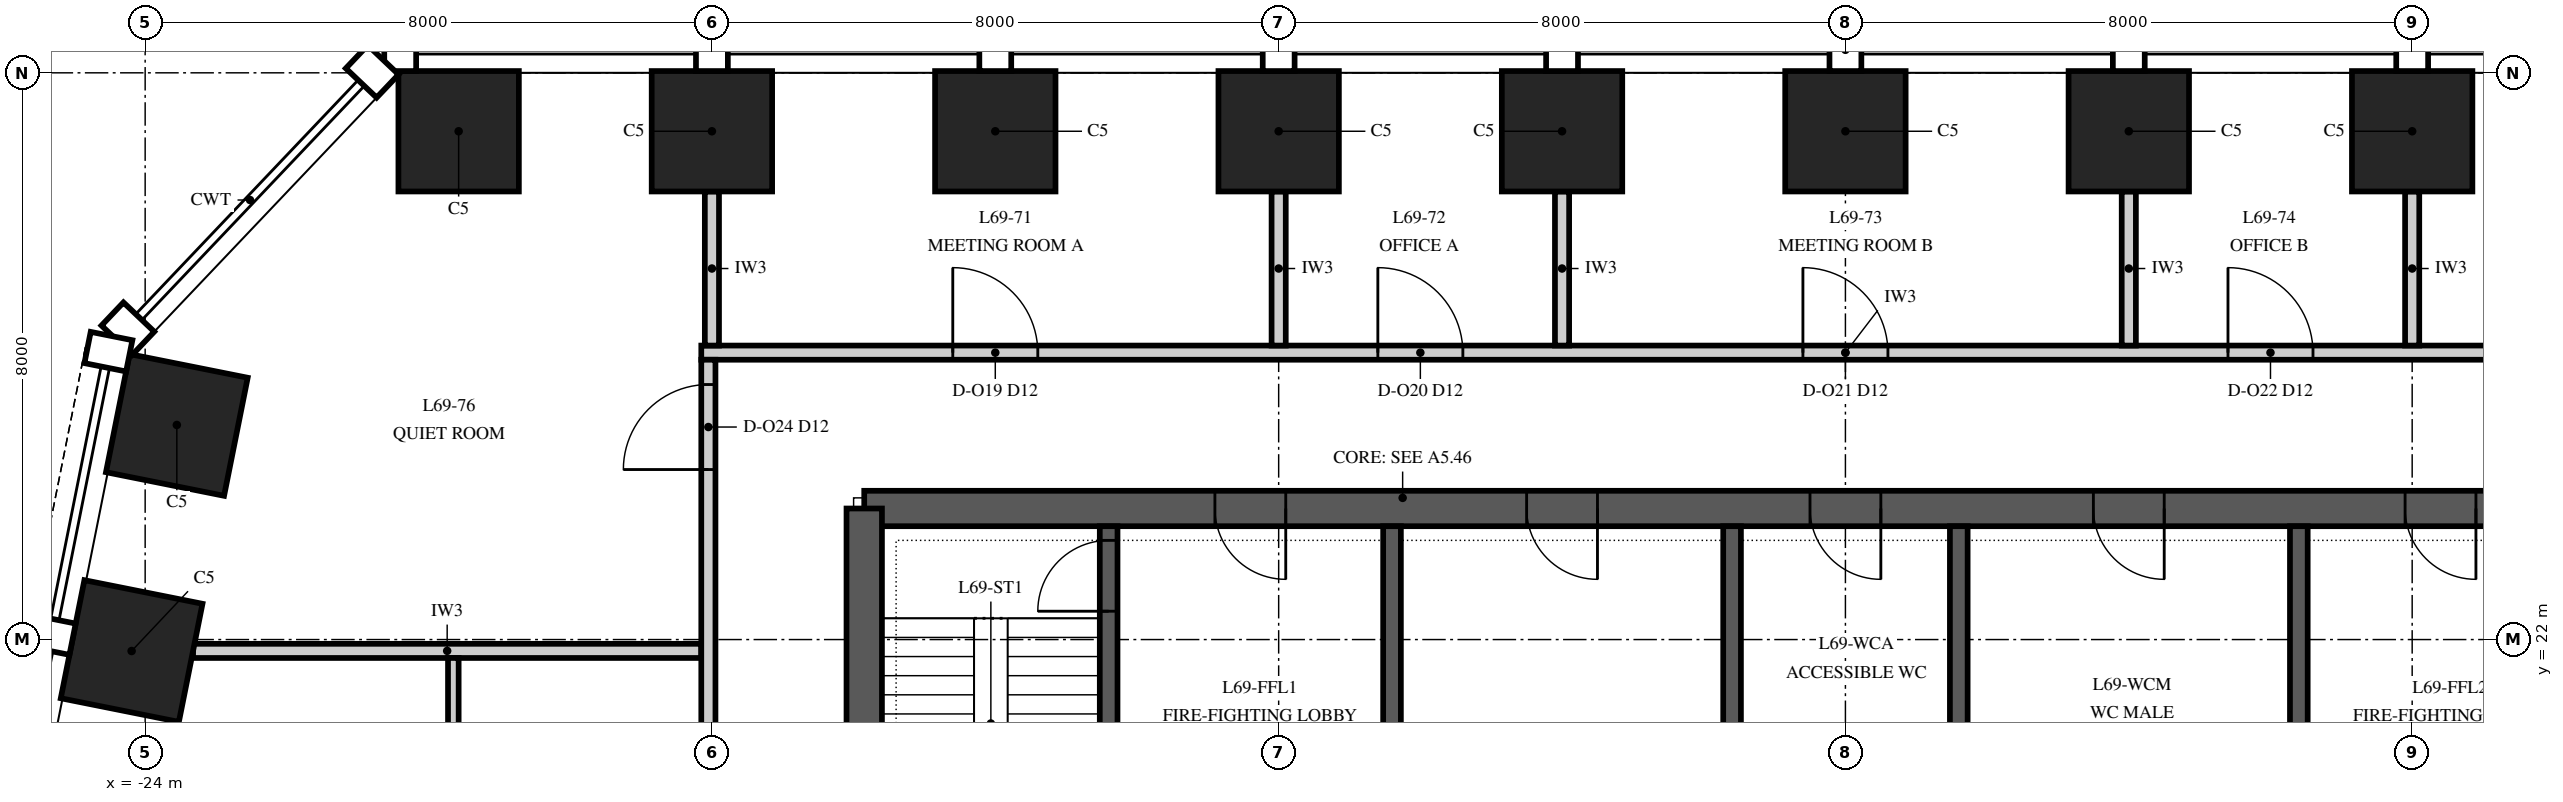
"""IFC4 building model, lengths in metres.
Left out: names, types, materials, properties, quantities, classifications, styles, units other than length and angle.
Written with IfcOpenShell. Run it as: python <this file> out.ifc"""

import sys

from ifc_helpers import new_model, si_unit, direction, frame, frame_2d, origin, origin_2d, place, context, subcontext, project, spatial, polyline, rectangle, outline, extrude, element, fill, save


model = new_model("IFC4")
c1 = context("Model", 3, precision=1e-05, world=origin(), true_north=direction((0.0, 1.0)))
c2 = subcontext(c1, "Body", "Model", "MODEL_VIEW")
j1 = project(units=[si_unit("LENGTHUNIT", "METRE"), si_unit("PLANEANGLEUNIT", "RADIAN")], contexts=[c1])
p1 = place(None, origin())
s1 = spatial("IfcSite", under=j1, at=p1, CompositionType="ELEMENT")
p2 = place(p1, origin())
s2 = spatial("IfcBuilding", under=s1, at=p2, CompositionType="ELEMENT")
p3 = place(p2, frame((0.0, 0.0, 296.0)))
s3 = spatial("IfcBuildingStorey", under=s2, at=p3, CompositionType="ELEMENT", Elevation=296.0)
for number, where, z_axis, x_axis in (
    (1, (8.0, 29.175, 0.0), (0.0, 0.0, 1.0), (-1.0, 0.0, 0.0)),
    (2, (4.0, 29.175, 0.0), (0.0, 0.0, 1.0), (-1.0, 0.0, 0.0)),
    (3, (0.0, 29.175, 0.0), (0.0, 0.0, 1.0), (-1.0, 0.0, 0.0)),
    (4, (-4.0, 29.175, 0.0), (0.0, 0.0, 1.0), (-1.0, 0.0, 0.0)),
    (5, (-8.0, 29.175, 0.0), (0.0, 0.0, 1.0), (-1.0, 0.0, 0.0)),
    (6, (-12.0, 29.175, 0.0), (0.0, 0.0, 1.0), (-1.0, 0.0, 0.0)),
    (7, (-16.0, 29.175, 0.0), (0.0, 0.0, 1.0), (-1.0, 0.0, 0.0)),
    (8, (-19.575, 29.175, 0.0), (0.0, 0.0, 1.0), (-1.0, 0.0, 0.0)),
    (9, (-23.553, 25.029, 0.0), (0.0, 0.0, 1.0), (-0.196, -0.981, 0.0)),
    (10, (-24.191, 21.838, 0.0), (0.0, 0.0, 1.0), (-0.196, -0.981, 0.0)),
):
    element("IfcColumn", number, at=place(p3, frame(where, z_axis=z_axis, x_axis=x_axis)), inside=s3, PredefinedType="COLUMN", context=c2, shape_type="SweptSolid", body=[
        extrude(rectangle(XDim=1.7, YDim=1.7, at=origin_2d()), origin(), (0.0, 0.0, 1.0), 4.0),
    ])
p4 = place(p3, frame((13.85, 23.85, 0.0), z_axis=(0.0, 0.0, 1.0), x_axis=(-1.0, 0.0, 0.0)))
e11 = element("IfcWall", 11, at=p4, inside=s3, PredefinedType="SHEAR", context=c2, shape_type="SweptSolid", body=[
    extrude(rectangle(XDim=27.7, YDim=0.5, at=frame_2d((13.85, 0.0))), origin(), (0.0, 0.0, 1.0), 4.0),
])
p5 = place(p4, frame((21.75, 0.0, 0.0)))
e12 = element("IfcOpeningElement", 12, at=p5, cuts=e11, PredefinedType="OPENING", context=c2, shape_type="SweptSolid", body=[
    extrude(rectangle(XDim=1.0, YDim=2.1, at=frame_2d((0.5, 1.05))), frame((0.0, 0.265, 0.0), z_axis=(0.0, -1.0, 0.0), x_axis=(1.0, 0.0, 0.0)), (0.0, 0.0, 1.0), 0.53),
])
p6 = place(p4, frame((4.95, 0.0, 0.0)))
e13 = element("IfcOpeningElement", 13, at=p6, cuts=e11, PredefinedType="OPENING", context=c2, shape_type="SweptSolid", body=[
    extrude(rectangle(XDim=1.0, YDim=2.1, at=frame_2d((0.5, 1.05))), frame((0.0, 0.265, 0.0), z_axis=(0.0, -1.0, 0.0), x_axis=(1.0, 0.0, 0.0)), (0.0, 0.0, 1.0), 0.53),
])
p7 = place(p4, frame((17.35, 0.0, 0.0)))
e14 = element("IfcOpeningElement", 14, at=p7, cuts=e11, PredefinedType="OPENING", context=c2, shape_type="SweptSolid", body=[
    extrude(rectangle(XDim=1.0, YDim=2.1, at=frame_2d((0.5, 1.05))), frame((0.0, 0.265, 0.0), z_axis=(0.0, -1.0, 0.0), x_axis=(1.0, 0.0, 0.0)), (0.0, 0.0, 1.0), 0.53),
])
p8 = place(p4, frame((13.35, 0.0, 0.0)))
e15 = element("IfcOpeningElement", 15, at=p8, cuts=e11, PredefinedType="OPENING", context=c2, shape_type="SweptSolid", body=[
    extrude(rectangle(XDim=1.0, YDim=2.1, at=frame_2d((0.5, 1.05))), frame((0.0, 0.265, 0.0), z_axis=(0.0, -1.0, 0.0), x_axis=(1.0, 0.0, 0.0)), (0.0, 0.0, 1.0), 0.53),
])
p9 = place(p4, frame((9.35, 0.0, 0.0)))
e16 = element("IfcOpeningElement", 16, at=p9, cuts=e11, PredefinedType="OPENING", context=c2, shape_type="SweptSolid", body=[
    extrude(rectangle(XDim=1.0, YDim=2.1, at=frame_2d((0.5, 1.05))), frame((0.0, 0.265, 0.0), z_axis=(0.0, -1.0, 0.0), x_axis=(1.0, 0.0, 0.0)), (0.0, 0.0, 1.0), 0.53),
])
p10 = place(p3, frame((-13.85, 23.85, 0.0), z_axis=(0.0, 0.0, 1.0), x_axis=(0.0, -1.0, 0.0)))
e17 = element("IfcWall", 17, at=p10, inside=s3, PredefinedType="SHEAR", context=c2, shape_type="SweptSolid", body=[
    extrude(outline(polyline([(0.0, -0.25), (17.7, -0.25), (17.7, 0.0), (17.45, 0.0), (17.45, 0.25), (0.25, 0.25), (0.25, 0.0), (0.0, 0.0), (0.0, -0.25)])), origin(), (0.0, 0.0, 1.0), 4.0),
])
p11 = place(p10, frame((11.75, 0.0, 0.0)))
e18 = element("IfcOpeningElement", 18, at=p11, cuts=e17, PredefinedType="OPENING", context=c2, shape_type="SweptSolid", body=[
    extrude(rectangle(XDim=1.8, YDim=2.4, at=frame_2d((0.9, 1.2))), frame((0.0, 0.265, 0.0), z_axis=(0.0, -1.0, 0.0), x_axis=(1.0, 0.0, 0.0)), (0.0, 0.0, 1.0), 0.53),
])
p12 = place(p3, frame((-10.4, 16.125, 0.0), z_axis=(0.0, 0.0, 1.0), x_axis=(0.0, 1.0, 0.0)))
e19 = element("IfcWall", 19, at=p12, inside=s3, PredefinedType="SHEAR", context=c2, shape_type="SweptSolid", body=[
    extrude(rectangle(XDim=7.475, YDim=0.25, at=frame_2d((3.738, 0.0))), origin(), (0.0, 0.0, 1.0), 4.0),
])
p13 = place(p12, frame((6.275, 0.0, 0.0)))
e20 = element("IfcOpeningElement", 20, at=p13, cuts=e19, PredefinedType="OPENING", context=c2, shape_type="SweptSolid", body=[
    extrude(rectangle(XDim=1.0, YDim=2.1, at=frame_2d((0.5, 1.05))), frame((0.0, 0.14, 0.0), z_axis=(0.0, -1.0, 0.0), x_axis=(1.0, 0.0, 0.0)), (0.0, 0.0, 1.0), 0.28),
])
for number, where, z_axis, x_axis in (
    (21, (-6.4, 16.125, 0.0), (0.0, 0.0, 1.0), (0.0, 1.0, 0.0)),
    (22, (-1.6, 16.125, 0.0), (0.0, 0.0, 1.0), (0.0, 1.0, 0.0)),
    (23, (1.6, 16.125, 0.0), (0.0, 0.0, 1.0), (0.0, 1.0, 0.0)),
    (24, (6.4, 16.125, 0.0), (0.0, 0.0, 1.0), (0.0, 1.0, 0.0)),
):
    element("IfcWall", number, at=place(p3, frame(where, z_axis=z_axis, x_axis=x_axis)), inside=s3, PredefinedType="SHEAR", context=c2, shape_type="SweptSolid", body=[
        extrude(rectangle(XDim=7.475, YDim=0.25, at=frame_2d((3.738, 0.0))), origin(), (0.0, 0.0, 1.0), 4.0),
    ])
p14 = place(p3, frame((-23.324, 21.84, 0.0), z_axis=(0.0, 0.0, 1.0), x_axis=(1.0, 0.0, 0.0)))
e25 = element("IfcWall", 25, at=p14, inside=s3, PredefinedType="PARTITIONING", context=c2, shape_type="SweptSolid", body=[
    extrude(rectangle(XDim=7.174, YDim=0.2, at=frame_2d((3.587, 0.0))), origin(), (0.0, 0.0, 1.0), 3.23),
])
p15 = place(p3, frame((-16.15, 26.05, 0.0), z_axis=(0.0, 0.0, 1.0), x_axis=(1.0, 0.0, 0.0)))
e26 = element("IfcWall", 26, at=p15, inside=s3, PredefinedType="PARTITIONING", context=c2, shape_type="SweptSolid", body=[
    extrude(rectangle(XDim=32.3, YDim=0.2, at=frame_2d((16.15, 0.0))), origin(), (0.0, 0.0, 1.0), 3.418),
])
p16 = place(p15, frame((3.55, 0.0, 0.0)))
e27 = element("IfcOpeningElement", 27, at=p16, cuts=e26, PredefinedType="OPENING", context=c2, shape_type="SweptSolid", body=[
    extrude(rectangle(XDim=1.2, YDim=2.4, at=frame_2d((0.6, 1.2))), frame((0.0, 0.115, 0.0), z_axis=(0.0, -1.0, 0.0), x_axis=(1.0, 0.0, 0.0)), (0.0, 0.0, 1.0), 0.23),
])
p17 = place(p15, frame((9.55, 0.0, 0.0)))
e28 = element("IfcOpeningElement", 28, at=p17, cuts=e26, PredefinedType="OPENING", context=c2, shape_type="SweptSolid", body=[
    extrude(rectangle(XDim=1.2, YDim=2.4, at=frame_2d((0.6, 1.2))), frame((0.0, 0.115, 0.0), z_axis=(0.0, -1.0, 0.0), x_axis=(1.0, 0.0, 0.0)), (0.0, 0.0, 1.0), 0.23),
])
p18 = place(p15, frame((15.55, 0.0, 0.0)))
e29 = element("IfcOpeningElement", 29, at=p18, cuts=e26, PredefinedType="OPENING", context=c2, shape_type="SweptSolid", body=[
    extrude(rectangle(XDim=1.2, YDim=2.4, at=frame_2d((0.6, 1.2))), frame((0.0, 0.115, 0.0), z_axis=(0.0, -1.0, 0.0), x_axis=(1.0, 0.0, 0.0)), (0.0, 0.0, 1.0), 0.23),
])
p19 = place(p15, frame((21.55, 0.0, 0.0)))
e30 = element("IfcOpeningElement", 30, at=p19, cuts=e26, PredefinedType="OPENING", context=c2, shape_type="SweptSolid", body=[
    extrude(rectangle(XDim=1.2, YDim=2.4, at=frame_2d((0.6, 1.2))), frame((0.0, 0.115, 0.0), z_axis=(0.0, -1.0, 0.0), x_axis=(1.0, 0.0, 0.0)), (0.0, 0.0, 1.0), 0.23),
])
p20 = place(p15, frame((27.55, 0.0, 0.0)))
e31 = element("IfcOpeningElement", 31, at=p20, cuts=e26, PredefinedType="OPENING", context=c2, shape_type="SweptSolid", body=[
    extrude(rectangle(XDim=1.2, YDim=2.4, at=frame_2d((0.6, 1.2))), frame((0.0, 0.115, 0.0), z_axis=(0.0, -1.0, 0.0), x_axis=(1.0, 0.0, 0.0)), (0.0, 0.0, 1.0), 0.23),
])
p21 = place(p3, frame((-19.65, 17.915, 0.0), z_axis=(0.0, 0.0, 1.0), x_axis=(0.0, 1.0, 0.0)))
e32 = element("IfcWall", 32, at=p21, inside=s3, PredefinedType="PARTITIONING", context=c2, shape_type="SweptSolid", body=[
    extrude(rectangle(XDim=3.825, YDim=0.15, at=frame_2d((1.913, 0.0))), origin(), (0.0, 0.0, 1.0), 3.23),
])
p22 = place(p21, frame((1.425, 0.0, 0.0)))
e33 = element("IfcOpeningElement", 33, at=p22, cuts=e32, PredefinedType="OPENING", context=c2, shape_type="SweptSolid", body=[
    extrude(rectangle(XDim=1.0, YDim=2.3, at=frame_2d((0.5, 1.15))), frame((0.0, 0.09, 0.0), z_axis=(0.0, -1.0, 0.0), x_axis=(1.0, 0.0, 0.0)), (0.0, 0.0, 1.0), 0.18),
])
p23 = place(p3, frame((-16.05, 4.05, 0.0), z_axis=(0.0, 0.0, 1.0), x_axis=(0.0, 1.0, 0.0)))
e34 = element("IfcWall", 34, at=p23, inside=s3, PredefinedType="PARTITIONING", context=c2, shape_type="SweptSolid", body=[
    extrude(rectangle(XDim=21.9, YDim=0.2, at=frame_2d((10.95, 0.0))), origin(), (0.0, 0.0, 1.0), 2.842),
])
p24 = place(p23, frame((0.25, 0.0, 0.0)))
e35 = element("IfcOpeningElement", 35, at=p24, cuts=e34, PredefinedType="OPENING", context=c2, shape_type="SweptSolid", body=[
    extrude(rectangle(XDim=1.2, YDim=2.4, at=frame_2d((0.6, 1.2))), frame((0.0, 0.115, 0.0), z_axis=(0.0, -1.0, 0.0), x_axis=(1.0, 0.0, 0.0)), (0.0, 0.0, 1.0), 0.23),
])
p25 = place(p23, frame((7.35, 0.0, 0.0)))
e36 = element("IfcOpeningElement", 36, at=p25, cuts=e34, PredefinedType="OPENING", context=c2, shape_type="SweptSolid", body=[
    extrude(rectangle(XDim=1.2, YDim=2.4, at=frame_2d((0.6, 1.2))), frame((0.0, 0.115, 0.0), z_axis=(0.0, -1.0, 0.0), x_axis=(1.0, 0.0, 0.0)), (0.0, 0.0, 1.0), 0.23),
])
p26 = place(p23, frame((20.35, 0.0, 0.0)))
e37 = element("IfcOpeningElement", 37, at=p26, cuts=e34, PredefinedType="OPENING", context=c2, shape_type="SweptSolid", body=[
    extrude(rectangle(XDim=1.2, YDim=2.4, at=frame_2d((0.6, 1.2))), frame((0.0, 0.115, 0.0), z_axis=(0.0, -1.0, 0.0), x_axis=(1.0, 0.0, 0.0)), (0.0, 0.0, 1.0), 0.23),
])
for number, where, z_axis, x_axis in (
    (38, (-16.0, 26.15, 0.0), (0.0, 0.0, 1.0), (0.0, 1.0, 0.0)),
    (39, (-8.0, 26.15, 0.0), (0.0, 0.0, 1.0), (0.0, 1.0, 0.0)),
    (40, (-4.0, 26.15, 0.0), (0.0, 0.0, 1.0), (0.0, 1.0, 0.0)),
    (41, (4.0, 26.15, 0.0), (0.0, 0.0, 1.0), (0.0, 1.0, 0.0)),
    (42, (8.0, 26.15, 0.0), (0.0, 0.0, 1.0), (0.0, 1.0, 0.0)),
):
    element("IfcWall", number, at=place(p3, frame(where, z_axis=z_axis, x_axis=x_axis)), inside=s3, PredefinedType="PARTITIONING", context=c2, shape_type="SweptSolid", body=[
        extrude(rectangle(XDim=2.175, YDim=0.2, at=frame_2d((1.087, 0.0))), origin(), (0.0, 0.0, 1.0), 3.418),
    ])
p27 = place(p5, origin())
e43 = element("IfcDoor", 43, at=p27, inside=s3, OperationType="SINGLE_SWING_RIGHT", PredefinedType="DOOR", context=c2, shape_type="SweptSolid", body=[
    extrude(rectangle(XDim=1.0, YDim=2.1, at=frame_2d((0.5, 1.05))), frame((0.0, 0.25, 0.0), z_axis=(0.0, -1.0, 0.0), x_axis=(1.0, 0.0, 0.0)), (0.0, 0.0, 1.0), 0.5),
])
fill(e12, e43)
p28 = place(p6, origin())
e44 = element("IfcDoor", 44, at=p28, inside=s3, OperationType="SINGLE_SWING_RIGHT", PredefinedType="DOOR", context=c2, shape_type="SweptSolid", body=[
    extrude(rectangle(XDim=1.0, YDim=2.1, at=frame_2d((0.5, 1.05))), frame((0.0, 0.25, 0.0), z_axis=(0.0, -1.0, 0.0), x_axis=(1.0, 0.0, 0.0)), (0.0, 0.0, 1.0), 0.5),
])
fill(e13, e44)
p29 = place(p7, origin())
e45 = element("IfcDoor", 45, at=p29, inside=s3, OperationType="SINGLE_SWING_LEFT", PredefinedType="DOOR", context=c2, shape_type="SweptSolid", body=[
    extrude(rectangle(XDim=1.0, YDim=2.1, at=frame_2d((0.5, 1.05))), frame((0.0, 0.25, 0.0), z_axis=(0.0, -1.0, 0.0), x_axis=(1.0, 0.0, 0.0)), (0.0, 0.0, 1.0), 0.5),
])
fill(e14, e45)
p30 = place(p8, origin())
e46 = element("IfcDoor", 46, at=p30, inside=s3, OperationType="SINGLE_SWING_LEFT", PredefinedType="DOOR", context=c2, shape_type="SweptSolid", body=[
    extrude(rectangle(XDim=1.0, YDim=2.1, at=frame_2d((0.5, 1.05))), frame((0.0, 0.25, 0.0), z_axis=(0.0, -1.0, 0.0), x_axis=(1.0, 0.0, 0.0)), (0.0, 0.0, 1.0), 0.5),
])
fill(e15, e46)
p31 = place(p9, origin())
e47 = element("IfcDoor", 47, at=p31, inside=s3, OperationType="SINGLE_SWING_LEFT", PredefinedType="DOOR", context=c2, shape_type="SweptSolid", body=[
    extrude(rectangle(XDim=1.0, YDim=2.1, at=frame_2d((0.5, 1.05))), frame((0.0, 0.25, 0.0), z_axis=(0.0, -1.0, 0.0), x_axis=(1.0, 0.0, 0.0)), (0.0, 0.0, 1.0), 0.5),
])
fill(e16, e47)
p32 = place(p13, origin())
e48 = element("IfcDoor", 48, at=p32, inside=s3, OperationType="SINGLE_SWING_LEFT", PredefinedType="DOOR", context=c2, shape_type="SweptSolid", body=[
    extrude(rectangle(XDim=1.0, YDim=2.1, at=frame_2d((0.5, 1.05))), frame((0.0, 0.125, 0.0), z_axis=(0.0, -1.0, 0.0), x_axis=(1.0, 0.0, 0.0)), (0.0, 0.0, 1.0), 0.25),
])
fill(e20, e48)
p33 = place(p16, origin())
e49 = element("IfcDoor", 49, at=p33, inside=s3, OperationType="SINGLE_SWING_LEFT", PredefinedType="DOOR", context=c2, shape_type="SweptSolid", body=[
    extrude(rectangle(XDim=1.2, YDim=2.4, at=frame_2d((0.6, 1.2))), frame((0.0, 0.1, 0.0), z_axis=(0.0, -1.0, 0.0), x_axis=(1.0, 0.0, 0.0)), (0.0, 0.0, 1.0), 0.199),
])
fill(e27, e49)
p34 = place(p17, origin())
e50 = element("IfcDoor", 50, at=p34, inside=s3, OperationType="SINGLE_SWING_LEFT", PredefinedType="DOOR", context=c2, shape_type="SweptSolid", body=[
    extrude(rectangle(XDim=1.2, YDim=2.4, at=frame_2d((0.6, 1.2))), frame((0.0, 0.1, 0.0), z_axis=(0.0, -1.0, 0.0), x_axis=(1.0, 0.0, 0.0)), (0.0, 0.0, 1.0), 0.199),
])
fill(e28, e50)
p35 = place(p18, origin())
e51 = element("IfcDoor", 51, at=p35, inside=s3, OperationType="SINGLE_SWING_LEFT", PredefinedType="DOOR", context=c2, shape_type="SweptSolid", body=[
    extrude(rectangle(XDim=1.2, YDim=2.4, at=frame_2d((0.6, 1.2))), frame((0.0, 0.1, 0.0), z_axis=(0.0, -1.0, 0.0), x_axis=(1.0, 0.0, 0.0)), (0.0, 0.0, 1.0), 0.199),
])
fill(e29, e51)
p36 = place(p19, origin())
e52 = element("IfcDoor", 52, at=p36, inside=s3, OperationType="SINGLE_SWING_LEFT", PredefinedType="DOOR", context=c2, shape_type="SweptSolid", body=[
    extrude(rectangle(XDim=1.2, YDim=2.4, at=frame_2d((0.6, 1.2))), frame((0.0, 0.1, 0.0), z_axis=(0.0, -1.0, 0.0), x_axis=(1.0, 0.0, 0.0)), (0.0, 0.0, 1.0), 0.199),
])
fill(e30, e52)
p37 = place(p26, origin())
e53 = element("IfcDoor", 53, at=p37, inside=s3, OperationType="SINGLE_SWING_LEFT", PredefinedType="DOOR", context=c2, shape_type="SweptSolid", body=[
    extrude(rectangle(XDim=1.2, YDim=2.4, at=frame_2d((0.6, 1.2))), frame((0.0, 0.1, 0.0), z_axis=(0.0, -1.0, 0.0), x_axis=(1.0, 0.0, 0.0)), (0.0, 0.0, 1.0), 0.199),
])
fill(e37, e53)
save(model, sys.argv[1])
